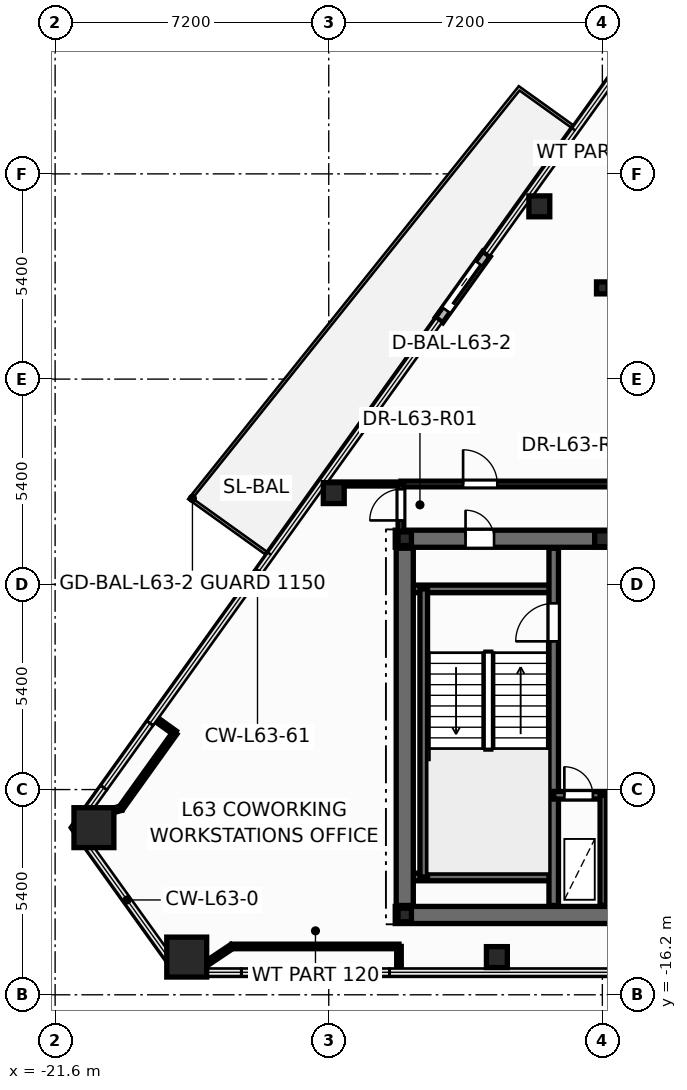
"""IFC4 building model, lengths in metres.
Left out: names, types, materials, properties, quantities, classifications, styles, units other than length and angle.
Written with IfcOpenShell. Run it as: python <this file> out.ifc"""

import sys

from ifc_helpers import new_model, si_unit, direction, frame, frame_2d, origin, origin_2d, place, context, subcontext, project, spatial, rectangle, hollow_rectangle, hollow_circle, i_section, extrude, element, fill, save


model = new_model("IFC4")
c1 = context("Model", 3, precision=1e-05, world=origin(), true_north=direction((0.0, 1.0)))
c2 = subcontext(c1, "Body", "Model", "MODEL_VIEW")
j1 = project(units=[si_unit("LENGTHUNIT", "METRE"), si_unit("PLANEANGLEUNIT", "RADIAN")], contexts=[c1])
p1 = place(None, origin())
s1 = spatial("IfcSite", under=j1, at=p1, CompositionType="ELEMENT")
p2 = place(p1, origin())
s2 = spatial("IfcBuilding", under=s1, at=p2, CompositionType="ELEMENT")
p3 = place(p2, frame((0.0, 0.0, 240.6)))
s3 = spatial("IfcBuildingStorey", under=s2, at=p3, CompositionType="ELEMENT", Elevation=240.6)
for number, where, z_axis, x_axis in (
    (1, (-20.579, -11.802, 0.0), (0.0, 0.0, 1.0), (1.0, 0.0, 0.0)),
    (2, (-18.137, -15.208, 0.0), (0.0, 0.0, 1.0), (1.0, 0.0, 0.0)),
):
    element("IfcColumn", number, at=place(p3, frame(where, z_axis=z_axis, x_axis=x_axis)), inside=s3, PredefinedType="COLUMN", context=c2, shape_type="SweptSolid", body=[
        extrude(hollow_rectangle(XDim=1.05, YDim=1.05, WallThickness=0.045, at=origin_2d()), origin(), (0.0, 0.0, 1.0), 3.6),
    ])
for number, where, z_axis, x_axis in (
    (3, (-9.976, -15.208, 0.0), (0.0, 0.0, 1.0), (1.0, 0.0, 0.0)),
    (4, (-8.858, 4.546, 0.0), (0.0, 0.0, 1.0), (1.0, 0.0, 0.0)),
    (5, (-14.268, -2.999, 0.0), (0.0, 0.0, 1.0), (1.0, 0.0, 0.0)),
):
    element("IfcColumn", number, at=place(p3, frame(where, z_axis=z_axis, x_axis=x_axis)), inside=s3, PredefinedType="COLUMN", context=c2, shape_type="SweptSolid", body=[
        extrude(hollow_circle(Radius=0.275, WallThickness=0.024, at=origin_2d()), origin(), (0.0, 0.0, 1.0), 3.6),
    ])
for number, where, z_axis, x_axis in (
    (6, (-12.4, -14.1, 0.0), (0.0, 0.0, 1.0), (1.0, 0.0, 0.0)),
    (7, (-12.4, -4.2, 0.0), (0.0, 0.0, 1.0), (1.0, 0.0, 0.0)),
):
    element("IfcColumn", number, at=place(p3, frame(where, z_axis=z_axis, x_axis=x_axis)), inside=s3, PredefinedType="COLUMN", context=c2, shape_type="SweptSolid", body=[
        extrude(i_section(OverallWidth=0.352, OverallDepth=0.359, WebThickness=0.018, FlangeThickness=0.026, at=origin_2d()), origin(), (0.0, 0.0, 1.0), 3.6),
    ])
p4 = place(p3, frame((-7.2, -4.2, 0.0), z_axis=(0.0, 0.0, 1.0), x_axis=(1.0, 0.0, 0.0)))
e8 = element("IfcColumn", 8, at=p4, inside=s3, PredefinedType="PILASTER", context=c2, shape_type="SweptSolid", body=[
    extrude(i_section(OverallWidth=0.405, OverallDepth=0.414, WebThickness=0.022, FlangeThickness=0.032, at=origin_2d()), origin(), (0.0, 0.0, 1.0), 3.6),
])
p5 = place(p3, frame((-7.2, 2.4, 0.0), z_axis=(0.0, 0.0, 1.0), x_axis=(1.0, 0.0, 0.0)))
e9 = element("IfcColumn", 9, at=p5, inside=s3, PredefinedType="COLUMN", context=c2, shape_type="SweptSolid", body=[
    extrude(i_section(OverallWidth=0.307, OverallDepth=0.314, WebThickness=0.012, FlangeThickness=0.019, at=origin_2d()), origin(), (0.0, 0.0, 1.0), 3.6),
])
p6 = place(p3, frame((-10.249, 3.293, -0.015), z_axis=(0.0, 0.0, 1.0), x_axis=(-0.58265081445, -0.812722602381, 0.0)))
e10 = element("IfcWall", 10, at=p6, inside=s3, PredefinedType="STANDARD", context=c2, shape_type="SweptSolid", body=[
    extrude(rectangle(XDim=2.14, YDim=0.24, at=frame_2d((1.07, 0.0))), origin(), (0.0, 0.0, 1.0), 2.813),
])
p7 = place(p6, frame((0.32, 0.0, 0.015)))
e11 = element("IfcOpeningElement", 11, at=p7, cuts=e10, PredefinedType="OPENING", context=c2, shape_type="SweptSolid", body=[
    extrude(rectangle(XDim=1.506, YDim=2.204, at=frame_2d((0.75, 1.102))), frame((0.0, 0.13, 0.0), z_axis=(0.0, -1.0, 0.0), x_axis=(1.0, 0.0, 0.0)), (0.0, 0.0, 1.0), 0.26),
])
p8 = place(p3, frame((-12.65, -14.1, 0.0), z_axis=(0.0, 0.0, 1.0), x_axis=(1.0, 0.0, 0.0)))
e12 = element("IfcWall", 12, at=p8, inside=s3, PredefinedType="SHEAR", context=c2, shape_type="SweptSolid", body=[
    extrude(rectangle(XDim=25.3, YDim=0.45, at=frame_2d((12.65, 0.0))), origin(), (0.0, 0.0, 1.0), 3.6),
])
p9 = place(p3, frame((-12.65, -4.2, 0.0), z_axis=(0.0, 0.0, 1.0), x_axis=(1.0, 0.0, 0.0)))
e13 = element("IfcWall", 13, at=p9, inside=s3, PredefinedType="SHEAR", context=c2, shape_type="SweptSolid", body=[
    extrude(rectangle(XDim=25.3, YDim=0.45, at=frame_2d((12.65, 0.0))), origin(), (0.0, 0.0, 1.0), 3.6),
])
p10 = place(p9, frame((1.85, 0.0, 0.0)))
e14 = element("IfcOpeningElement", 14, at=p10, cuts=e13, PredefinedType="OPENING", context=c2, shape_type="SweptSolid", body=[
    extrude(rectangle(XDim=0.756, YDim=2.054, at=frame_2d((0.375, 1.027))), frame((0.0, 0.235, 0.0), z_axis=(0.0, -1.0, 0.0), x_axis=(1.0, 0.0, 0.0)), (0.0, 0.0, 1.0), 0.47),
])
p11 = place(p9, frame((22.65, 0.0, 0.0)))
e15 = element("IfcOpeningElement", 15, at=p11, cuts=e13, PredefinedType="OPENING", context=c2, shape_type="SweptSolid", body=[
    extrude(rectangle(XDim=0.756, YDim=2.054, at=frame_2d((0.375, 1.027))), frame((0.0, 0.235, 0.0), z_axis=(0.0, -1.0, 0.0), x_axis=(1.0, 0.0, 0.0)), (0.0, 0.0, 1.0), 0.47),
])
p12 = place(p9, frame((5.85, 0.0, 0.0)))
e16 = element("IfcOpeningElement", 16, at=p12, cuts=e13, PredefinedType="OPENING", context=c2, shape_type="SweptSolid", body=[
    extrude(rectangle(XDim=1.006, YDim=2.104, at=frame_2d((0.5, 1.052))), frame((0.0, 0.235, 0.0), z_axis=(0.0, -1.0, 0.0), x_axis=(1.0, 0.0, 0.0)), (0.0, 0.0, 1.0), 0.47),
])
p13 = place(p9, frame((10.35, 0.0, 0.0)))
e17 = element("IfcOpeningElement", 17, at=p13, cuts=e13, PredefinedType="OPENING", context=c2, shape_type="SweptSolid", body=[
    extrude(rectangle(XDim=1.406, YDim=2.154, at=frame_2d((0.7, 1.077))), frame((0.0, 0.235, 0.0), z_axis=(0.0, -1.0, 0.0), x_axis=(1.0, 0.0, 0.0)), (0.0, 0.0, 1.0), 0.47),
])
p14 = place(p9, frame((18.45, 0.0, 0.0)))
e18 = element("IfcOpeningElement", 18, at=p14, cuts=e13, PredefinedType="OPENING", context=c2, shape_type="SweptSolid", body=[
    extrude(rectangle(XDim=1.006, YDim=2.104, at=frame_2d((0.5, 1.052))), frame((0.0, 0.235, 0.0), z_axis=(0.0, -1.0, 0.0), x_axis=(1.0, 0.0, 0.0)), (0.0, 0.0, 1.0), 0.47),
])
for number, where, z_axis, x_axis in (
    (19, (-12.35, -5.52, 0.0), (0.0, 0.0, 1.0), (1.0, 0.0, 0.0)),
    (20, (-12.35, -13.1, 0.0), (0.0, 0.0, 1.0), (1.0, 0.0, 0.0)),
):
    element("IfcWall", number, at=place(p3, frame(where, z_axis=z_axis, x_axis=x_axis)), inside=s3, PredefinedType="SOLIDWALL", context=c2, shape_type="SweptSolid", body=[
        extrude(rectangle(XDim=3.87, YDim=0.2, at=frame_2d((1.935, 0.0))), origin(), (0.0, 0.0, 1.0), 3.6),
    ])
p15 = place(p3, frame((-11.9, -13.1, 0.0), z_axis=(0.0, 0.0, 1.0), x_axis=(0.0, 1.0, 0.0)))
e21 = element("IfcWall", 21, at=p15, inside=s3, PredefinedType="SOLIDWALL", context=c2, shape_type="SweptSolid", body=[
    extrude(rectangle(XDim=7.58, YDim=0.2, at=frame_2d((3.79, 0.0))), origin(), (0.0, 0.0, 1.0), 3.6),
])
p16 = place(p3, frame((-8.48, -13.85, 0.0), z_axis=(0.0, 0.0, 1.0), x_axis=(0.0, 1.0, 0.0)))
e22 = element("IfcWall", 22, at=p16, inside=s3, PredefinedType="SHEAR", context=c2, shape_type="SweptSolid", body=[
    extrude(rectangle(XDim=9.4, YDim=0.25, at=frame_2d((4.7, 0.0))), origin(), (0.0, 0.0, 1.0), 3.6),
])
p17 = place(p16, frame((6.95, 0.0, 0.0)))
e23 = element("IfcOpeningElement", 23, at=p17, cuts=e22, PredefinedType="OPENING", context=c2, shape_type="SweptSolid", body=[
    extrude(rectangle(XDim=1.006, YDim=2.104, at=frame_2d((0.5, 1.052))), frame((0.0, 0.135, 0.0), z_axis=(0.0, -1.0, 0.0), x_axis=(1.0, 0.0, 0.0)), (0.0, 0.0, 1.0), 0.27),
])
p18 = place(p3, frame((-8.48, -10.95, 0.0), z_axis=(0.0, 0.0, 1.0), x_axis=(1.0, 0.0, 0.0)))
e24 = element("IfcWall", 24, at=p18, inside=s3, PredefinedType="SOLIDWALL", context=c2, shape_type="SweptSolid", body=[
    extrude(rectangle(XDim=3.36, YDim=0.2, at=frame_2d((1.68, 0.0))), origin(), (0.0, 0.0, 1.0), 3.6),
])
p19 = place(p18, frame((0.28, 0.0, 0.0)))
e25 = element("IfcOpeningElement", 25, at=p19, cuts=e24, PredefinedType="OPENING", context=c2, shape_type="SweptSolid", body=[
    extrude(rectangle(XDim=0.756, YDim=2.054, at=frame_2d((0.375, 1.027))), frame((0.0, 0.11, 0.0), z_axis=(0.0, -1.0, 0.0), x_axis=(1.0, 0.0, 0.0)), (0.0, 0.0, 1.0), 0.22),
])
p20 = place(p18, frame((1.85, 0.0, 0.0)))
e26 = element("IfcOpeningElement", 26, at=p20, cuts=e24, PredefinedType="OPENING", context=c2, shape_type="SweptSolid", body=[
    extrude(rectangle(XDim=1.106, YDim=2.104, at=frame_2d((0.55, 1.052))), frame((0.0, 0.11, 0.0), z_axis=(0.0, -1.0, 0.0), x_axis=(1.0, 0.0, 0.0)), (0.0, 0.0, 1.0), 0.22),
])
p21 = place(p3, frame((-7.18, -13.85, 0.0), z_axis=(0.0, 0.0, 1.0), x_axis=(0.0, 1.0, 0.0)))
e27 = element("IfcWall", 27, at=p21, inside=s3, PredefinedType="PARTITIONING", context=c2, shape_type="SweptSolid", body=[
    extrude(rectangle(XDim=2.9, YDim=0.16, at=frame_2d((1.45, 0.0))), origin(), (0.0, 0.0, 1.0), 2.505),
])
p22 = place(p3, frame((-12.4, -13.85, 0.0), z_axis=(0.0, 0.0, 1.0), x_axis=(0.0, 1.0, 0.0)))
e28 = element("IfcWall", 28, at=p22, inside=s3, PredefinedType="SHEAR", context=c2, shape_type="SweptSolid", body=[
    extrude(rectangle(XDim=9.4, YDim=0.45, at=frame_2d((4.7, 0.0))), origin(), (0.0, 0.0, 1.0), 3.6),
])
p23 = place(p3, frame((-12.5, -2.76, 0.0), z_axis=(0.0, 0.0, 1.0), x_axis=(1.0, 0.0, 0.0)))
e29 = element("IfcWall", 29, at=p23, inside=s3, PredefinedType="PARTITIONING", context=c2, shape_type="SweptSolid", body=[
    extrude(rectangle(XDim=7.76, YDim=0.15, at=frame_2d((3.88, 0.0))), origin(), (0.0, 0.0, 1.0), 2.255),
])
p24 = place(p23, frame((1.635, 0.0, 0.0)))
e30 = element("IfcOpeningElement", 30, at=p24, cuts=e29, PredefinedType="OPENING", context=c2, shape_type="SweptSolid", body=[
    extrude(rectangle(XDim=0.906, YDim=2.104, at=frame_2d((0.45, 1.052))), frame((0.0, 0.085, 0.0), z_axis=(0.0, -1.0, 0.0), x_axis=(1.0, 0.0, 0.0)), (0.0, 0.0, 1.0), 0.17),
])
p25 = place(p3, frame((-16.947, -14.928, 0.0), z_axis=(0.0, 0.0, 1.0), x_axis=(1.0, 0.0, 0.0)))
e31 = element("IfcWall", 31, at=p25, inside=s3, PredefinedType="PARTITIONING", context=c2, shape_type="SweptSolid", body=[
    extrude(rectangle(XDim=4.395, YDim=0.12, at=frame_2d((2.197, 0.0))), origin(), (0.0, 0.0, 1.0), 3.28),
])
p26 = place(p3, frame((-18.446, -9.308, 0.0), z_axis=(0.0, 0.0, 1.0), x_axis=(-0.58269400411, -0.812691637446, 0.0)))
e32 = element("IfcWall", 32, at=p26, inside=s3, PredefinedType="PARTITIONING", context=c2, shape_type="SweptSolid", body=[
    extrude(rectangle(XDim=2.441, YDim=0.12, at=frame_2d((1.221, 0.0))), origin(), (0.0, 0.0, 1.0), 2.255),
])
p27 = place(p3, frame((-14.588, -2.76, 0.0), z_axis=(0.0, 0.0, 1.0), x_axis=(1.0, 0.0, 0.0)))
e33 = element("IfcWall", 33, at=p27, inside=s3, PredefinedType="PARTITIONING", context=c2, shape_type="SweptSolid", body=[
    extrude(rectangle(XDim=2.088, YDim=0.105, at=frame_2d((1.044, 0.0))), origin(), (0.0, 0.0, 1.0), 2.653),
])
p28 = place(p3, frame((-12.5, -4.24, 0.0), z_axis=(0.0, 0.0, 1.0), x_axis=(0.0, 1.0, 0.0)))
e34 = element("IfcWall", 34, at=p28, inside=s3, PredefinedType="PARTITIONING", context=c2, shape_type="SweptSolid", body=[
    extrude(rectangle(XDim=1.48, YDim=0.15, at=frame_2d((0.74, 0.0))), origin(), (0.0, 0.0, 1.0), 2.255),
])
p29 = place(p28, frame((0.522, 0.0, 0.0)))
e35 = element("IfcOpeningElement", 35, at=p29, cuts=e34, PredefinedType="OPENING", context=c2, shape_type="SweptSolid", body=[
    extrude(rectangle(XDim=0.826, YDim=2.104, at=frame_2d((0.41, 1.052))), frame((0.0, 0.085, 0.0), z_axis=(0.0, -1.0, 0.0), x_axis=(1.0, 0.0, 0.0)), (0.0, 0.0, 1.0), 0.17),
])
p30 = place(p3, frame((-17.657, -15.403, 0.0), z_axis=(0.0, 0.0, 1.0), x_axis=(0.831434816422, 0.555622305205, 0.0)))
e36 = element("IfcWall", 36, at=p30, inside=s3, PredefinedType="PARTITIONING", context=c2, shape_type="SweptSolid", body=[
    extrude(rectangle(XDim=0.855, YDim=0.12, at=frame_2d((0.427, 0.0))), origin(), (0.0, 0.0, 1.0), 2.798),
])
p31 = place(p3, frame((-19.869, -11.292, 0.0), z_axis=(0.0, 0.0, 1.0), x_axis=(-0.961480716813, -0.274872390751, 0.0)))
e37 = element("IfcWall", 37, at=p31, inside=s3, PredefinedType="PARTITIONING", context=c2, shape_type="SweptSolid", body=[
    extrude(rectangle(XDim=0.853, YDim=0.12, at=frame_2d((0.426, 0.0))), origin(), (0.0, 0.0, 1.0), 2.255),
])
p32 = place(p3, frame((-12.552, -14.928, 0.0), z_axis=(0.0, 0.0, 1.0), x_axis=(0.0, -1.0, 0.0)))
e38 = element("IfcWall", 38, at=p32, inside=s3, PredefinedType="PARTITIONING", context=c2, shape_type="SweptSolid", body=[
    extrude(rectangle(XDim=0.67, YDim=0.12, at=frame_2d((0.335, 0.0))), origin(), (0.0, 0.0, 1.0), 2.798),
])
p33 = place(p3, frame((-18.991, -8.917, 0.0), z_axis=(0.0, 0.0, 1.0), x_axis=(0.812673311452, -0.582719562786, 0.0)))
e39 = element("IfcWall", 39, at=p33, inside=s3, PredefinedType="PARTITIONING", context=c2, shape_type="SweptSolid", body=[
    extrude(rectangle(XDim=0.67, YDim=0.12, at=frame_2d((0.335, 0.0))), origin(), (0.0, 0.0, 1.0), 2.798),
])
p34 = place(p7, origin())
e40 = element("IfcDoor", 40, at=p34, inside=s3, OperationType="SLIDING_TO_RIGHT", PredefinedType="DOOR", context=c2, shape_type="SweptSolid", body=[
    extrude(rectangle(XDim=1.5, YDim=2.2, at=frame_2d((0.75, 1.1))), frame((0.0, 0.025, 0.0), z_axis=(0.0, -1.0, 0.0), x_axis=(1.0, 0.0, 0.0)), (0.0, 0.0, 1.0), 0.05),
])
fill(e11, e40)
p35 = place(p17, origin())
e41 = element("IfcDoor", 41, at=p35, inside=s3, OperationType="SINGLE_SWING_LEFT", PredefinedType="DOOR", context=c2, shape_type="SweptSolid", body=[
    extrude(rectangle(XDim=1.0, YDim=2.1, at=frame_2d((0.5, 1.05))), frame((0.0, 0.025, 0.0), z_axis=(0.0, -1.0, 0.0), x_axis=(1.0, 0.0, 0.0)), (0.0, 0.0, 1.0), 0.05),
])
fill(e23, e41)
p36 = place(p19, origin())
e42 = element("IfcDoor", 42, at=p36, inside=s3, OperationType="SINGLE_SWING_LEFT", PredefinedType="DOOR", context=c2, shape_type="SweptSolid", body=[
    extrude(rectangle(XDim=0.75, YDim=2.05, at=frame_2d((0.375, 1.025))), frame((0.0, 0.025, 0.0), z_axis=(0.0, -1.0, 0.0), x_axis=(1.0, 0.0, 0.0)), (0.0, 0.0, 1.0), 0.05),
])
fill(e25, e42)
p37 = place(p10, origin())
e43 = element("IfcDoor", 43, at=p37, inside=s3, OperationType="SINGLE_SWING_LEFT", PredefinedType="DOOR", context=c2, shape_type="SweptSolid", body=[
    extrude(rectangle(XDim=0.75, YDim=2.05, at=frame_2d((0.375, 1.025))), frame((0.0, 0.025, 0.0), z_axis=(0.0, -1.0, 0.0), x_axis=(1.0, 0.0, 0.0)), (0.0, 0.0, 1.0), 0.05),
])
fill(e14, e43)
p38 = place(p29, origin())
e44 = element("IfcDoor", 44, at=p38, inside=s3, OperationType="SINGLE_SWING_LEFT", PredefinedType="DOOR", context=c2, shape_type="SweptSolid", body=[
    extrude(rectangle(XDim=0.82, YDim=2.1, at=frame_2d((0.41, 1.05))), frame((0.0, 0.025, 0.0), z_axis=(0.0, -1.0, 0.0), x_axis=(1.0, 0.0, 0.0)), (0.0, 0.0, 1.0), 0.05),
])
fill(e35, e44)
p39 = place(p24, origin())
e45 = element("IfcDoor", 45, at=p39, inside=s3, OperationType="SINGLE_SWING_LEFT", PredefinedType="DOOR", context=c2, shape_type="SweptSolid", body=[
    extrude(rectangle(XDim=0.9, YDim=2.1, at=frame_2d((0.45, 1.05))), frame((0.0, 0.025, 0.0), z_axis=(0.0, -1.0, 0.0), x_axis=(1.0, 0.0, 0.0)), (0.0, 0.0, 1.0), 0.05),
])
fill(e30, e45)
save(model, sys.argv[1])
